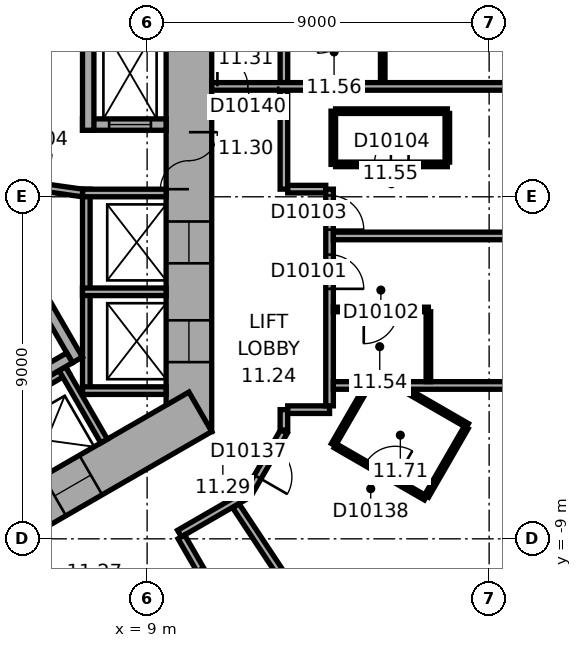
"""IFC4 building model, lengths in metres.
Left out: names, types, materials, properties, quantities, classifications, styles, units other than length and angle.
Written with IfcOpenShell. Run it as: python <this file> out.ifc"""

import sys

from ifc_helpers import new_model, si_unit, direction, frame, frame_2d, origin, place, context, subcontext, project, spatial, rectangle, extrude, element, fill, save


model = new_model("IFC4")
c1 = context("Model", 3, precision=1e-05, world=origin(), true_north=direction((0.0, 1.0)))
c2 = subcontext(c1, "Body", "Model", "MODEL_VIEW")
j1 = project(units=[si_unit("LENGTHUNIT", "METRE"), si_unit("PLANEANGLEUNIT", "RADIAN")], contexts=[c1])
p1 = place(None, origin())
s1 = spatial("IfcSite", under=j1, at=p1, CompositionType="ELEMENT")
p2 = place(p1, origin())
s2 = spatial("IfcBuilding", under=s1, at=p2, CompositionType="ELEMENT")
p3 = place(p2, frame((0.0, 0.0, 57.2)))
s3 = spatial("IfcBuildingStorey", under=s2, at=p3, CompositionType="ELEMENT", Elevation=57.2)
p4 = place(p3, frame((10.1, -6.177, 0.0), z_axis=(0.0, 0.0, 1.0), x_axis=(0.0, 1.0, 0.0)))
e1 = element("IfcWall", 1, at=p4, inside=s3, PredefinedType="SHEAR", context=c2, shape_type="SweptSolid", body=[
    extrude(rectangle(XDim=12.355, YDim=1.2, at=frame_2d((6.177, 0.0))), origin(), (0.0, 0.0, 1.0), 3.3),
])
p5 = place(p4, frame((6.378, 0.0, 0.0)))
e2 = element("IfcOpeningElement", 2, at=p5, cuts=e1, PredefinedType="OPENING", context=c2, shape_type="SweptSolid", body=[
    extrude(rectangle(XDim=1.5, YDim=2.1, at=frame_2d((0.75, 1.05))), frame((0.0, 0.61, 0.0), z_axis=(0.0, -1.0, 0.0), x_axis=(1.0, 0.0, 0.0)), (0.0, 0.0, 1.0), 1.22),
])
p6 = place(p4, frame((1.828, 0.0, 0.0)))
e3 = element("IfcOpeningElement", 3, at=p6, cuts=e1, PredefinedType="OPENING", context=c2, shape_type="SweptSolid", body=[
    extrude(rectangle(XDim=1.1, YDim=2.1, at=frame_2d((0.55, 1.05))), frame((0.0, 0.61, 0.0), z_axis=(0.0, -1.0, 0.0), x_axis=(1.0, 0.0, 0.0)), (0.0, 0.0, 1.0), 1.22),
])
p7 = place(p4, frame((4.427, 0.0, 0.0)))
e4 = element("IfcOpeningElement", 4, at=p7, cuts=e1, PredefinedType="OPENING", context=c2, shape_type="SweptSolid", body=[
    extrude(rectangle(XDim=1.1, YDim=2.1, at=frame_2d((0.55, 1.05))), frame((0.0, 0.61, 0.0), z_axis=(0.0, -1.0, 0.0), x_axis=(1.0, 0.0, 0.0)), (0.0, 0.0, 1.0), 1.22),
])
p8 = place(p3, frame((-0.3, -11.836, 0.0), z_axis=(0.0, 0.0, 1.0), x_axis=(0.866021384402, 0.500006961711, 0.0)))
e5 = element("IfcWall", 5, at=p8, inside=s3, PredefinedType="SHEAR", context=c2, shape_type="SweptSolid", body=[
    extrude(rectangle(XDim=12.355, YDim=1.2, at=frame_2d((6.178, 0.0))), origin(), (0.0, 0.0, 1.0), 3.3),
])
p9 = place(p8, frame((4.128, 0.0, 0.0)))
e6 = element("IfcOpeningElement", 6, at=p9, cuts=e5, PredefinedType="OPENING", context=c2, shape_type="SweptSolid", body=[
    extrude(rectangle(XDim=0.9, YDim=2.1, at=frame_2d((0.45, 1.05))), frame((0.0, 0.61, 0.0), z_axis=(0.0, -1.0, 0.0), x_axis=(1.0, 0.0, 0.0)), (0.0, 0.0, 1.0), 1.22),
])
p10 = place(p8, frame((7.928, 0.0, 0.0)))
e7 = element("IfcOpeningElement", 7, at=p10, cuts=e5, PredefinedType="OPENING", context=c2, shape_type="SweptSolid", body=[
    extrude(rectangle(XDim=1.1, YDim=2.1, at=frame_2d((0.55, 1.05))), frame((0.0, 0.61, 0.0), z_axis=(0.0, -1.0, 0.0), x_axis=(1.0, 0.0, 0.0)), (0.0, 0.0, 1.0), 1.22),
])
p11 = place(p3, frame((7.4, -5.2, 0.0), z_axis=(0.0, 0.0, 1.0), x_axis=(0.0, 1.0, 0.0)))
e8 = element("IfcWall", 8, at=p11, inside=s3, PredefinedType="PARTITIONING", context=c2, shape_type="SweptSolid", body=[
    extrude(rectangle(XDim=5.4, YDim=0.2, at=frame_2d((2.7, 0.0))), origin(), (0.0, 0.0, 1.0), 3.05),
])
for number, where, z_axis, x_axis in (
    (9, (7.3, -5.1, 0.0), (0.0, 0.0, 1.0), (1.0, 0.0, 0.0)),
    (10, (7.3, -2.5, 0.0), (0.0, 0.0, 1.0), (1.0, 0.0, 0.0)),
    (11, (7.3, 0.1, 0.0), (0.0, 0.0, 1.0), (1.0, 0.0, 0.0)),
):
    element("IfcWall", number, at=place(p3, frame(where, z_axis=z_axis, x_axis=x_axis)), inside=s3, PredefinedType="PARTITIONING", context=c2, shape_type="SweptSolid", body=[
        extrude(rectangle(XDim=2.2, YDim=0.2, at=frame_2d((1.1, 0.0))), origin(), (0.0, 0.0, 1.0), 3.05),
    ])
p12 = place(p3, frame((-0.024, -8.559, 0.0), z_axis=(0.0, 0.0, 1.0), x_axis=(0.866026010844, 0.49999894854, 0.0)))
e12 = element("IfcWall", 12, at=p12, inside=s3, PredefinedType="PARTITIONING", context=c2, shape_type="SweptSolid", body=[
    extrude(rectangle(XDim=8.0, YDim=0.2, at=frame_2d((4.0, 0.0))), origin(), (0.0, 0.0, 1.0), 3.05),
])
p13 = place(p3, frame((6.768, -4.522, 0.0), z_axis=(0.0, 0.0, 1.0), x_axis=(0.50002983664, -0.866008176907, 0.0)))
e13 = element("IfcWall", 13, at=p13, inside=s3, PredefinedType="PARTITIONING", context=c2, shape_type="SweptSolid", body=[
    extrude(rectangle(XDim=2.2, YDim=0.2, at=frame_2d((1.1, 0.0))), origin(), (0.0, 0.0, 1.0), 3.05),
])
p14 = place(p3, frame((4.158, 0.602, 0.0), z_axis=(0.0, 0.0, 1.0), x_axis=(0.499977259774, 0.866038532462, 0.0)))
e14 = element("IfcWall", 14, at=p14, inside=s3, PredefinedType="SHEAR", context=c2, shape_type="SweptSolid", body=[
    extrude(rectangle(XDim=4.7, YDim=0.3, at=frame_2d((2.35, 0.0))), origin(), (0.0, 0.0, 1.0), 3.05),
])
p15 = place(p14, frame((0.8, 0.0, 0.0)))
e15 = element("IfcOpeningElement", 15, at=p15, cuts=e14, PredefinedType="OPENING", context=c2, shape_type="SweptSolid", body=[
    extrude(rectangle(XDim=1.2, YDim=2.1, at=frame_2d((0.6, 1.05))), frame((0.0, 0.16, 0.0), z_axis=(0.0, -1.0, 0.0), x_axis=(1.0, 0.0, 0.0)), (0.0, 0.0, 1.0), 0.32),
])
p16 = place(p3, frame((4.816, -0.222, 0.0), z_axis=(0.0, 0.0, 1.0), x_axis=(0.499977259774, -0.866038532462, 0.0)))
e16 = element("IfcWall", 16, at=p16, inside=s3, PredefinedType="SHEAR", context=c2, shape_type="SweptSolid", body=[
    extrude(rectangle(XDim=4.7, YDim=0.3, at=frame_2d((2.35, 0.0))), origin(), (0.0, 0.0, 1.0), 3.05),
])
p17 = place(p3, frame((0.847, -7.767, 0.0), z_axis=(0.0, 0.0, 1.0), x_axis=(0.866027801685, 0.499995846692, 0.0)))
e17 = element("IfcWall", 17, at=p17, inside=s3, PredefinedType="SHEAR", context=c2, shape_type="SweptSolid", body=[
    extrude(rectangle(XDim=7.06, YDim=0.3, at=frame_2d((3.53, 0.0))), origin(), (0.0, 0.0, 1.0), 3.05),
])
p18 = place(p3, frame((7.3, 1.9, 0.0), z_axis=(0.0, 0.0, 1.0), x_axis=(1.0, 0.0, 0.0)))
e18 = element("IfcWall", 18, at=p18, inside=s3, PredefinedType="SHEAR", context=c2, shape_type="SweptSolid", body=[
    extrude(rectangle(XDim=2.2, YDim=0.3, at=frame_2d((1.1, 0.0))), origin(), (0.0, 0.0, 1.0), 3.05),
])
p19 = place(p18, frame((0.7, 0.0, 0.0)))
e19 = element("IfcOpeningElement", 19, at=p19, cuts=e18, PredefinedType="OPENING", context=c2, shape_type="SweptSolid", body=[
    extrude(rectangle(XDim=1.1, YDim=2.1, at=frame_2d((0.55, 1.05))), frame((0.0, 0.16, 0.0), z_axis=(0.0, -1.0, 0.0), x_axis=(1.0, 0.0, 0.0)), (0.0, 0.0, 1.0), 0.32),
])
p20 = place(p3, frame((7.45, 1.75, 0.0), z_axis=(0.0, 0.0, 1.0), x_axis=(0.0, 1.0, 0.0)))
e20 = element("IfcWall", 20, at=p20, inside=s3, PredefinedType="SHEAR", context=c2, shape_type="SweptSolid", body=[
    extrude(rectangle(XDim=3.35, YDim=0.3, at=frame_2d((1.675, 0.0))), origin(), (0.0, 0.0, 1.0), 3.05),
])
p21 = place(p3, frame((4.327, 0.521, 0.0), z_axis=(0.0, 0.0, 1.0), x_axis=(0.990124376366, -0.14019172346, 0.0)))
e21 = element("IfcWall", 21, at=p21, inside=s3, PredefinedType="PARTITIONING", context=c2, shape_type="SweptSolid", body=[
    extrude(rectangle(XDim=3.002, YDim=0.2, at=frame_2d((1.501, 0.0))), origin(), (0.0, 0.0, 1.0), 3.05),
])
p22 = place(p21, frame((1.15, 0.0, 0.0)))
e22 = element("IfcOpeningElement", 22, at=p22, cuts=e21, PredefinedType="OPENING", context=c2, shape_type="SweptSolid", body=[
    extrude(rectangle(XDim=0.9, YDim=2.1, at=frame_2d((0.45, 1.05))), frame((0.0, 0.11, 0.0), z_axis=(0.0, -1.0, 0.0), x_axis=(1.0, 0.0, 0.0)), (0.0, 0.0, 1.0), 0.22),
])
p23 = place(p3, frame((9.852, -8.861, 0.0), z_axis=(0.0, 0.0, 1.0), x_axis=(0.866013291437, 0.500020978615, 0.0)))
e23 = element("IfcWall", 23, at=p23, inside=s3, PredefinedType="PARTITIONING", context=c2, shape_type="SweptSolid", body=[
    extrude(rectangle(XDim=2.077, YDim=0.2, at=frame_2d((1.038, 0.0))), origin(), (0.0, 0.0, 1.0), 3.05),
])
p24 = place(p3, frame((10.402, -9.815, 0.0), z_axis=(0.0, 0.0, 1.0), x_axis=(-0.499968756647, 0.866043441391, 0.0)))
e24 = element("IfcWall", 24, at=p24, inside=s3, PredefinedType="PARTITIONING", context=c2, shape_type="SweptSolid", body=[
    extrude(rectangle(XDim=1.001, YDim=0.2, at=frame_2d((0.5, 0.0))), origin(), (0.0, 0.0, 1.0), 3.05),
])
p25 = place(p3, frame((11.67, -7.788, 0.0), z_axis=(0.0, 0.0, 1.0), x_axis=(0.500063286585, 0.865988862174, 0.0)))
e25 = element("IfcWall", 25, at=p25, inside=s3, PredefinedType="PARTITIONING", context=c2, shape_type="SweptSolid", body=[
    extrude(rectangle(XDim=1.86, YDim=0.2, at=frame_2d((0.93, 0.0))), origin(), (0.0, 0.0, 1.0), 3.05),
])
p26 = place(p25, frame((0.48, 0.0, 0.0)))
e26 = element("IfcOpeningElement", 26, at=p26, cuts=e25, PredefinedType="OPENING", context=c2, shape_type="SweptSolid", body=[
    extrude(rectangle(XDim=0.9, YDim=2.1, at=frame_2d((0.45, 1.05))), frame((0.0, 0.11, 0.0), z_axis=(0.0, -1.0, 0.0), x_axis=(1.0, 0.0, 0.0)), (0.0, 0.0, 1.0), 0.22),
])
p27 = place(p3, frame((12.6, -6.138, 0.0), z_axis=(0.0, 0.0, 1.0), x_axis=(0.0, 1.0, 0.0)))
e27 = element("IfcWall", 27, at=p27, inside=s3, PredefinedType="PARTITIONING", context=c2, shape_type="SweptSolid", body=[
    extrude(rectangle(XDim=0.537, YDim=0.2, at=frame_2d((0.268, 0.0))), origin(), (0.0, 0.0, 1.0), 3.05),
])
p28 = place(p3, frame((12.6, 0.201, 0.0), z_axis=(0.0, 0.0, 1.0), x_axis=(0.0, 1.0, 0.0)))
e28 = element("IfcWall", 28, at=p28, inside=s3, PredefinedType="PARTITIONING", context=c2, shape_type="SweptSolid", body=[
    extrude(rectangle(XDim=2.604, YDim=0.2, at=frame_2d((1.302, 0.0))), origin(), (0.0, 0.0, 1.0), 3.05),
])
p29 = place(p3, frame((12.6, 3.004, 0.0), z_axis=(0.0, 0.0, 1.0), x_axis=(0.0, 1.0, 0.0)))
e29 = element("IfcWall", 29, at=p29, inside=s3, PredefinedType="PARTITIONING", context=c2, shape_type="SweptSolid", body=[
    extrude(rectangle(XDim=3.173, YDim=0.2, at=frame_2d((1.586, 0.0))), origin(), (0.0, 0.0, 1.0), 3.05),
])
p30 = place(p29, frame((1.998, 0.0, 0.0)))
e30 = element("IfcOpeningElement", 30, at=p30, cuts=e29, PredefinedType="OPENING", context=c2, shape_type="SweptSolid", body=[
    extrude(rectangle(XDim=0.9, YDim=2.1, at=frame_2d((0.45, 1.05))), frame((0.0, 0.11, 0.0), z_axis=(0.0, -1.0, 0.0), x_axis=(1.0, 0.0, 0.0)), (0.0, 0.0, 1.0), 0.22),
])
p31 = place(p3, frame((12.7, -5.601, 0.0), z_axis=(0.0, 0.0, 1.0), x_axis=(1.0, 0.0, 0.0)))
e31 = element("IfcWall", 31, at=p31, inside=s3, PredefinedType="PARTITIONING", context=c2, shape_type="SweptSolid", body=[
    extrude(rectangle(XDim=1.101, YDim=0.2, at=frame_2d((0.551, 0.0))), origin(), (0.0, 0.0, 1.0), 3.05),
])
p32 = place(p3, frame((13.701, 0.201, 0.0), z_axis=(0.0, 0.0, 1.0), x_axis=(-1.0, 0.0, 0.0)))
e32 = element("IfcWall", 32, at=p32, inside=s3, PredefinedType="PARTITIONING", context=c2, shape_type="SweptSolid", body=[
    extrude(rectangle(XDim=1.001, YDim=0.2, at=frame_2d((0.5, 0.0))), origin(), (0.0, 0.0, 1.0), 3.05),
])
p33 = place(p3, frame((13.801, -5.501, 0.0), z_axis=(0.0, 0.0, 1.0), x_axis=(0.0, 1.0, 0.0)))
e33 = element("IfcWall", 33, at=p33, inside=s3, PredefinedType="PARTITIONING", context=c2, shape_type="SweptSolid", body=[
    extrude(rectangle(XDim=5.702, YDim=0.2, at=frame_2d((2.851, 0.0))), origin(), (0.0, 0.0, 1.0), 3.05),
])
p34 = place(p33, frame((3.079, 0.0, 0.0)))
e34 = element("IfcOpeningElement", 34, at=p34, cuts=e33, PredefinedType="OPENING", context=c2, shape_type="SweptSolid", body=[
    extrude(rectangle(XDim=0.9, YDim=2.1, at=frame_2d((0.45, 1.05))), frame((0.0, 0.11, 0.0), z_axis=(0.0, -1.0, 0.0), x_axis=(1.0, 0.0, 0.0)), (0.0, 0.0, 1.0), 0.22),
])
p35 = place(p33, frame((4.636, 0.0, 0.0)))
e35 = element("IfcOpeningElement", 35, at=p35, cuts=e33, PredefinedType="OPENING", context=c2, shape_type="SweptSolid", body=[
    extrude(rectangle(XDim=0.9, YDim=2.1, at=frame_2d((0.45, 1.05))), frame((0.0, 0.11, 0.0), z_axis=(0.0, -1.0, 0.0), x_axis=(1.0, 0.0, 0.0)), (0.0, 0.0, 1.0), 0.22),
])
p36 = place(p3, frame((13.901, -6.524, 0.0), z_axis=(0.0, 0.0, 1.0), x_axis=(0.499964162598, 0.86604609353, 0.0)))
e36 = element("IfcWall", 36, at=p36, inside=s3, PredefinedType="PARTITIONING", context=c2, shape_type="SweptSolid", body=[
    extrude(rectangle(XDim=1.661, YDim=0.12, at=frame_2d((0.831, 0.0))), origin(), (0.0, 0.0, 1.0), 3.05),
])
p37 = place(p3, frame((13.901, -4.965, 0.0), z_axis=(0.0, 0.0, 1.0), x_axis=(1.0, 0.0, 0.0)))
e37 = element("IfcWall", 37, at=p37, inside=s3, PredefinedType="PARTITIONING", context=c2, shape_type="SweptSolid", body=[
    extrude(rectangle(XDim=8.049, YDim=0.2, at=frame_2d((4.024, 0.0))), origin(), (0.0, 0.0, 1.0), 3.05),
])
p38 = place(p3, frame((13.901, -2.965, 0.0), z_axis=(0.0, 0.0, 1.0), x_axis=(1.0, 0.0, 0.0)))
e38 = element("IfcWall", 38, at=p38, inside=s3, PredefinedType="PARTITIONING", context=c2, shape_type="SweptSolid", body=[
    extrude(rectangle(XDim=2.5, YDim=0.12, at=frame_2d((1.25, 0.0))), origin(), (0.0, 0.0, 1.0), 3.05),
])
p39 = place(p38, frame((0.8, 0.0, 0.0)))
e39 = element("IfcOpeningElement", 39, at=p39, cuts=e38, PredefinedType="OPENING", context=c2, shape_type="SweptSolid", body=[
    extrude(rectangle(XDim=0.9, YDim=2.1, at=frame_2d((0.45, 1.05))), frame((0.0, 0.07, 0.0), z_axis=(0.0, -1.0, 0.0), x_axis=(1.0, 0.0, 0.0)), (0.0, 0.0, 1.0), 0.14),
])
p40 = place(p3, frame((13.9, 0.853, 0.0), z_axis=(0.0, 0.0, 1.0), x_axis=(0.0, 1.0, 0.0)))
e40 = element("IfcWall", 40, at=p40, inside=s3, PredefinedType="PARTITIONING", context=c2, shape_type="SweptSolid", body=[
    extrude(rectangle(XDim=1.4, YDim=0.12, at=frame_2d((0.7, 0.0))), origin(), (0.0, 0.0, 1.0), 3.05),
])
p41 = place(p3, frame((13.96, 2.253, 0.0), z_axis=(0.0, 0.0, 1.0), x_axis=(1.0, 0.0, 0.0)))
e41 = element("IfcWall", 41, at=p41, inside=s3, PredefinedType="PARTITIONING", context=c2, shape_type="SweptSolid", body=[
    extrude(rectangle(XDim=2.94, YDim=0.12, at=frame_2d((1.47, 0.0))), origin(), (0.0, 0.0, 1.0), 3.05),
])
p42 = place(p3, frame((15.2, 4.618, 0.0), z_axis=(0.0, 0.0, 1.0), x_axis=(0.0, -1.0, 0.0)))
e42 = element("IfcWall", 42, at=p42, inside=s3, PredefinedType="PARTITIONING", context=c2, shape_type="SweptSolid", body=[
    extrude(rectangle(XDim=1.613, YDim=0.12, at=frame_2d((0.807, 0.0))), origin(), (0.0, 0.0, 1.0), 3.05),
])
p43 = place(p3, frame((15.841, -5.104, 0.0), z_axis=(0.0, 0.0, 1.0), x_axis=(0.866025591402, -0.499999675036, 0.0)))
e43 = element("IfcWall", 43, at=p43, inside=s3, PredefinedType="PARTITIONING", context=c2, shape_type="SweptSolid", body=[
    extrude(rectangle(XDim=1.83, YDim=0.12, at=frame_2d((0.915, 0.0))), origin(), (0.0, 0.0, 1.0), 3.05),
])
p44 = place(p3, frame((16.255, -15.564, 0.0), z_axis=(0.0, 0.0, 1.0), x_axis=(-0.55192208744, 0.833895682562, 0.0)))
e44 = element("IfcWall", 44, at=p44, inside=s3, PredefinedType="PARTITIONING", context=c2, shape_type="SweptSolid", body=[
    extrude(rectangle(XDim=8.913, YDim=0.2, at=frame_2d((4.457, 0.0))), origin(), (0.0, 0.0, 1.0), 2.6),
])
p45 = place(p3, frame((16.326, -7.925, 0.0), z_axis=(0.0, 0.0, 1.0), x_axis=(-0.865997131366, 0.500048966069, 0.0)))
e45 = element("IfcWall", 45, at=p45, inside=s3, PredefinedType="PARTITIONING", context=c2, shape_type="SweptSolid", body=[
    extrude(rectangle(XDim=2.74, YDim=0.12, at=frame_2d((1.37, 0.0))), origin(), (0.0, 0.0, 1.0), 3.05),
])
p46 = place(p45, frame((0.92, 0.0, 0.0)))
e46 = element("IfcOpeningElement", 46, at=p46, cuts=e45, PredefinedType="OPENING", context=c2, shape_type="SweptSolid", body=[
    extrude(rectangle(XDim=0.9, YDim=2.1, at=frame_2d((0.45, 1.05))), frame((0.0, 0.07, 0.0), z_axis=(0.0, -1.0, 0.0), x_axis=(1.0, 0.0, 0.0)), (0.0, 0.0, 1.0), 0.14),
])
p47 = place(p3, frame((16.401, -3.025, 0.0), z_axis=(0.0, 0.0, 1.0), x_axis=(0.0, -1.0, 0.0)))
e47 = element("IfcWall", 47, at=p47, inside=s3, PredefinedType="PARTITIONING", context=c2, shape_type="SweptSolid", body=[
    extrude(rectangle(XDim=1.84, YDim=0.12, at=frame_2d((0.92, 0.0))), origin(), (0.0, 0.0, 1.0), 3.05),
])
p48 = place(p3, frame((16.9, 0.853, 0.0), z_axis=(0.0, 0.0, 1.0), x_axis=(-1.0, 0.0, 0.0)))
e48 = element("IfcWall", 48, at=p48, inside=s3, PredefinedType="PARTITIONING", context=c2, shape_type="SweptSolid", body=[
    extrude(rectangle(XDim=2.94, YDim=0.12, at=frame_2d((1.47, 0.0))), origin(), (0.0, 0.0, 1.0), 3.05),
])
p49 = place(p48, frame((1.02, 0.0, 0.0)))
e49 = element("IfcOpeningElement", 49, at=p49, cuts=e48, PredefinedType="OPENING", context=c2, shape_type="SweptSolid", body=[
    extrude(rectangle(XDim=0.9, YDim=2.1, at=frame_2d((0.45, 1.05))), frame((0.0, 0.07, 0.0), z_axis=(0.0, -1.0, 0.0), x_axis=(1.0, 0.0, 0.0)), (0.0, 0.0, 1.0), 0.14),
])
p50 = place(p3, frame((16.9, 2.193, 0.0), z_axis=(0.0, 0.0, 1.0), x_axis=(0.0, -1.0, 0.0)))
e50 = element("IfcWall", 50, at=p50, inside=s3, PredefinedType="PARTITIONING", context=c2, shape_type="SweptSolid", body=[
    extrude(rectangle(XDim=1.28, YDim=0.12, at=frame_2d((0.64, 0.0))), origin(), (0.0, 0.0, 1.0), 3.05),
])
p51 = place(p3, frame((17.396, -6.071, 0.0), z_axis=(0.0, 0.0, 1.0), x_axis=(-0.500027264788, -0.866009661879, 0.0)))
e51 = element("IfcWall", 51, at=p51, inside=s3, PredefinedType="PARTITIONING", context=c2, shape_type="SweptSolid", body=[
    extrude(rectangle(XDim=2.08, YDim=0.12, at=frame_2d((1.04, 0.0))), origin(), (0.0, 0.0, 1.0), 3.05),
])
p52 = place(p3, frame((21.95, -1.03, 0.0), z_axis=(0.0, 0.0, 1.0), x_axis=(-1.0, 0.0, 0.0)))
e52 = element("IfcWall", 52, at=p52, inside=s3, PredefinedType="PARTITIONING", context=c2, shape_type="SweptSolid", body=[
    extrude(rectangle(XDim=8.049, YDim=0.2, at=frame_2d((4.024, 0.0))), origin(), (0.0, 0.0, 1.0), 2.6),
])
p53 = place(p3, frame((21.95, 2.905, 0.0), z_axis=(0.0, 0.0, 1.0), x_axis=(-1.0, 0.0, 0.0)))
e53 = element("IfcWall", 53, at=p53, inside=s3, PredefinedType="PARTITIONING", context=c2, shape_type="SweptSolid", body=[
    extrude(rectangle(XDim=11.25, YDim=0.2, at=frame_2d((5.625, 0.0))), origin(), (0.0, 0.0, 1.0), 3.05),
])
p54 = place(p53, frame((9.5, 0.0, 0.0)))
e54 = element("IfcOpeningElement", 54, at=p54, cuts=e53, PredefinedType="OPENING", context=c2, shape_type="SweptSolid", body=[
    extrude(rectangle(XDim=1.6, YDim=2.1, at=frame_2d((0.8, 1.05))), frame((0.0, 0.11, 0.0), z_axis=(0.0, -1.0, 0.0), x_axis=(1.0, 0.0, 0.0)), (0.0, 0.0, 1.0), 0.22),
])
p55 = place(p5, origin())
e55 = element("IfcDoor", 55, at=p55, inside=s3, OperationType="DOUBLE_DOOR_SINGLE_SWING", PredefinedType="DOOR", context=c2, shape_type="SweptSolid", body=[
    extrude(rectangle(XDim=1.5, YDim=2.1, at=frame_2d((0.75, 1.05))), frame((0.0, 0.025, 0.0), z_axis=(0.0, -1.0, 0.0), x_axis=(1.0, 0.0, 0.0)), (0.0, 0.0, 1.0), 0.05),
])
fill(e2, e55)
p56 = place(p19, origin())
e56 = element("IfcDoor", 56, at=p56, inside=s3, OperationType="DOUBLE_DOOR_SLIDING", PredefinedType="DOOR", context=c2, shape_type="SweptSolid", body=[
    extrude(rectangle(XDim=1.1, YDim=2.1, at=frame_2d((0.55, 1.05))), frame((0.0, 0.025, 0.0), z_axis=(0.0, -1.0, 0.0), x_axis=(1.0, 0.0, 0.0)), (0.0, 0.0, 1.0), 0.05),
])
fill(e19, e56)
p57 = place(p6, origin())
e57 = element("IfcDoor", 57, at=p57, inside=s3, OperationType="DOUBLE_DOOR_SLIDING", PredefinedType="DOOR", context=c2, shape_type="SweptSolid", body=[
    extrude(rectangle(XDim=1.1, YDim=2.1, at=frame_2d((0.55, 1.05))), frame((0.0, 0.025, 0.0), z_axis=(0.0, -1.0, 0.0), x_axis=(1.0, 0.0, 0.0)), (0.0, 0.0, 1.0), 0.05),
])
fill(e3, e57)
p58 = place(p7, origin())
e58 = element("IfcDoor", 58, at=p58, inside=s3, OperationType="DOUBLE_DOOR_SLIDING", PredefinedType="DOOR", context=c2, shape_type="SweptSolid", body=[
    extrude(rectangle(XDim=1.1, YDim=2.1, at=frame_2d((0.55, 1.05))), frame((0.0, 0.025, 0.0), z_axis=(0.0, -1.0, 0.0), x_axis=(1.0, 0.0, 0.0)), (0.0, 0.0, 1.0), 0.05),
])
fill(e4, e58)
p59 = place(p10, origin())
e59 = element("IfcDoor", 59, at=p59, inside=s3, OperationType="DOUBLE_DOOR_SLIDING", PredefinedType="DOOR", context=c2, shape_type="SweptSolid", body=[
    extrude(rectangle(XDim=1.1, YDim=2.1, at=frame_2d((0.55, 1.05))), frame((0.0, 0.025, 0.0), z_axis=(0.0, -1.0, 0.0), x_axis=(1.0, 0.0, 0.0)), (0.0, 0.0, 1.0), 0.05),
])
fill(e7, e59)
p60 = place(p34, origin())
e60 = element("IfcDoor", 60, at=p60, inside=s3, OperationType="SINGLE_SWING_LEFT", PredefinedType="DOOR", context=c2, shape_type="SweptSolid", body=[
    extrude(rectangle(XDim=0.9, YDim=2.1, at=frame_2d((0.45, 1.05))), frame((0.0, 0.025, 0.0), z_axis=(0.0, -1.0, 0.0), x_axis=(1.0, 0.0, 0.0)), (0.0, 0.0, 1.0), 0.05),
])
fill(e34, e60)
p61 = place(p39, origin())
e61 = element("IfcDoor", 61, at=p61, inside=s3, OperationType="SINGLE_SWING_LEFT", PredefinedType="DOOR", context=c2, shape_type="SweptSolid", body=[
    extrude(rectangle(XDim=0.9, YDim=2.1, at=frame_2d((0.45, 1.05))), frame((0.0, 0.025, 0.0), z_axis=(0.0, -1.0, 0.0), x_axis=(1.0, 0.0, 0.0)), (0.0, 0.0, 1.0), 0.05),
])
fill(e39, e61)
p62 = place(p35, origin())
e62 = element("IfcDoor", 62, at=p62, inside=s3, OperationType="SINGLE_SWING_LEFT", PredefinedType="DOOR", context=c2, shape_type="SweptSolid", body=[
    extrude(rectangle(XDim=0.9, YDim=2.1, at=frame_2d((0.45, 1.05))), frame((0.0, 0.025, 0.0), z_axis=(0.0, -1.0, 0.0), x_axis=(1.0, 0.0, 0.0)), (0.0, 0.0, 1.0), 0.05),
])
fill(e35, e62)
p63 = place(p49, origin())
e63 = element("IfcDoor", 63, at=p63, inside=s3, OperationType="SINGLE_SWING_LEFT", PredefinedType="DOOR", context=c2, shape_type="SweptSolid", body=[
    extrude(rectangle(XDim=0.9, YDim=2.1, at=frame_2d((0.45, 1.05))), frame((0.0, 0.025, 0.0), z_axis=(0.0, -1.0, 0.0), x_axis=(1.0, 0.0, 0.0)), (0.0, 0.0, 1.0), 0.05),
])
fill(e49, e63)
p64 = place(p26, origin())
e64 = element("IfcDoor", 64, at=p64, inside=s3, OperationType="SINGLE_SWING_LEFT", PredefinedType="DOOR", context=c2, shape_type="SweptSolid", body=[
    extrude(rectangle(XDim=0.9, YDim=2.1, at=frame_2d((0.45, 1.05))), frame((0.0, 0.025, 0.0), z_axis=(0.0, -1.0, 0.0), x_axis=(1.0, 0.0, 0.0)), (0.0, 0.0, 1.0), 0.05),
])
fill(e26, e64)
p65 = place(p46, origin())
e65 = element("IfcDoor", 65, at=p65, inside=s3, OperationType="SINGLE_SWING_LEFT", PredefinedType="DOOR", context=c2, shape_type="SweptSolid", body=[
    extrude(rectangle(XDim=0.9, YDim=2.1, at=frame_2d((0.45, 1.05))), frame((0.0, 0.025, 0.0), z_axis=(0.0, -1.0, 0.0), x_axis=(1.0, 0.0, 0.0)), (0.0, 0.0, 1.0), 0.05),
])
fill(e46, e65)
p66 = place(p54, origin())
e66 = element("IfcDoor", 66, at=p66, inside=s3, OperationType="DOUBLE_DOOR_SINGLE_SWING", PredefinedType="DOOR", context=c2, shape_type="SweptSolid", body=[
    extrude(rectangle(XDim=1.6, YDim=2.1, at=frame_2d((0.8, 1.05))), frame((0.0, 0.025, 0.0), z_axis=(0.0, -1.0, 0.0), x_axis=(1.0, 0.0, 0.0)), (0.0, 0.0, 1.0), 0.05),
])
fill(e54, e66)
save(model, sys.argv[1])
